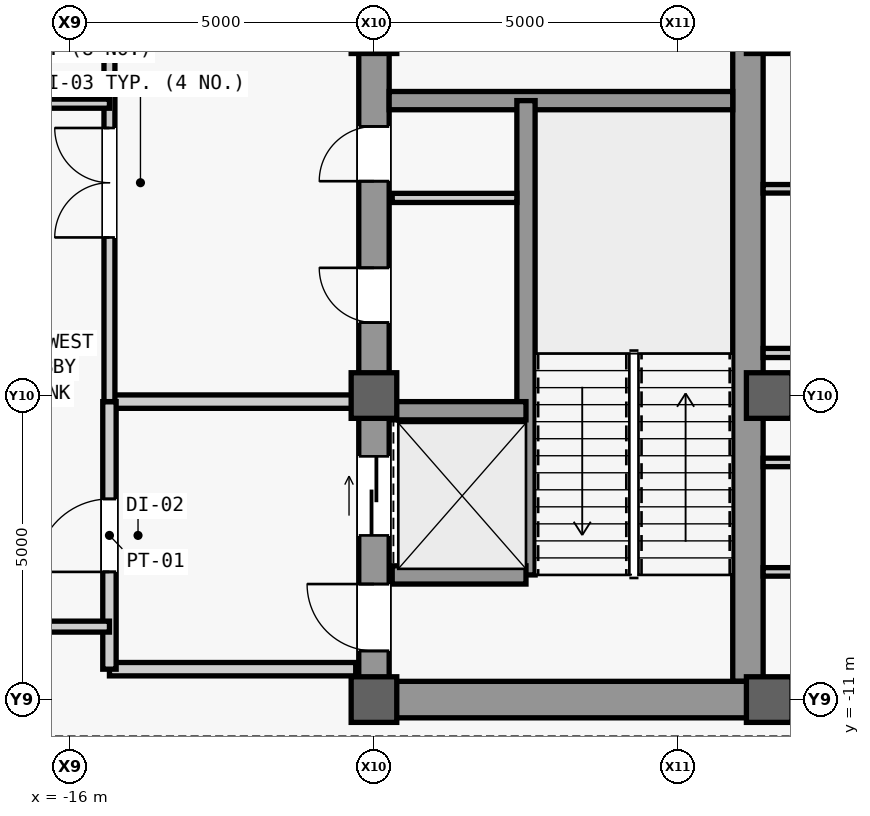
"""IFC4 building model, lengths in metres.
Left out: names, types, materials, properties, quantities, classifications, styles, units other than length and angle.
Written with IfcOpenShell. Run it as: python <this file> out.ifc"""

import sys

from ifc_helpers import new_model, si_unit, direction, frame, frame_2d, origin, origin_2d, place, context, subcontext, project, spatial, rectangle, extrude, source, transform, mapped, element, fill, save


model = new_model("IFC4")
c1 = context("Model", 3, precision=1e-05, world=origin(), true_north=direction((0.0, 1.0)))
c2 = subcontext(c1, "Body", "Model", "MODEL_VIEW")
j1 = project(units=[si_unit("LENGTHUNIT", "METRE"), si_unit("PLANEANGLEUNIT", "RADIAN")], contexts=[c1])
p1 = place(None, origin())
s1 = spatial("IfcSite", under=j1, at=p1, CompositionType="ELEMENT")
p2 = place(p1, origin())
s2 = spatial("IfcBuilding", under=s1, at=p2, CompositionType="ELEMENT")
p3 = place(p2, frame((0.0, 0.0, 321.5)))
s3 = spatial("IfcBuildingStorey", under=s2, at=p3, CompositionType="ELEMENT", Elevation=321.5)
m1 = source(origin(), c2, "Body", "SweptSolid", [
    extrude(rectangle(XDim=22.0, YDim=0.5, at=frame_2d((11.0, 0.0))), origin(), (0.0, 0.0, 1.0), 4.54),
])
p4 = place(p3, frame((-11.0, -11.0, 0.0), z_axis=(0.0, 0.0, 1.0), x_axis=(0.0, 1.0, 0.0)))
e1 = element("IfcWall", 1, at=p4, inside=s3, PredefinedType="SHEAR", context=c2, shape_type="MappedRepresentation", body=[
    mapped(m1, transform((0.0, 0.0, 0.0), scale=1.0)),
])
m2 = source(origin(), c2, "Body", "SweptSolid", [
    extrude(rectangle(XDim=1.1, YDim=2.2, at=frame_2d((0.55, 1.1))), frame((0.0, 0.26, 0.0), z_axis=(0.0, -1.0, 0.0), x_axis=(1.0, 0.0, 0.0)), (0.0, 0.0, 1.0), 0.52),
])
p5 = place(p4, frame((0.8, 0.0, 0.0)))
e2 = element("IfcOpeningElement", 2, at=p5, cuts=e1, PredefinedType="OPENING", context=c2, shape_type="MappedRepresentation", body=[
    mapped(m2, transform((0.0, 0.0, 0.0), scale=1.0)),
])
p6 = place(p4, frame((12.5, 0.0, 0.0)))
e3 = element("IfcOpeningElement", 3, at=p6, cuts=e1, PredefinedType="OPENING", context=c2, shape_type="MappedRepresentation", body=[
    mapped(m2, transform((0.0, 0.0, 0.0), scale=1.0)),
])
m3 = source(origin(), c2, "Body", "SweptSolid", [
    extrude(rectangle(XDim=0.9, YDim=2.15, at=frame_2d((0.45, 1.075))), frame((0.0, 0.26, 0.0), z_axis=(0.0, -1.0, 0.0), x_axis=(1.0, 0.0, 0.0)), (0.0, 0.0, 1.0), 0.52),
])
p7 = place(p4, frame((6.2, 0.0, 0.0)))
e4 = element("IfcOpeningElement", 4, at=p7, cuts=e1, PredefinedType="OPENING", context=c2, shape_type="MappedRepresentation", body=[
    mapped(m3, transform((0.0, 0.0, 0.0), scale=1.0)),
])
p8 = place(p4, frame((8.525, 0.0, 0.0)))
e5 = element("IfcOpeningElement", 5, at=p8, cuts=e1, PredefinedType="OPENING", context=c2, shape_type="MappedRepresentation", body=[
    mapped(m3, transform((0.0, 0.0, 0.0), scale=1.0)),
])
m4 = source(origin(), c2, "Body", "SweptSolid", [
    extrude(rectangle(XDim=1.2, YDim=2.3, at=frame_2d((0.6, 1.15))), frame((0.0, 0.26, 0.0), z_axis=(0.0, -1.0, 0.0), x_axis=(1.0, 0.0, 0.0)), (0.0, 0.0, 1.0), 0.52),
])
p9 = place(p4, frame((14.6, 0.0, 0.0)))
e6 = element("IfcOpeningElement", 6, at=p9, cuts=e1, PredefinedType="OPENING", context=c2, shape_type="MappedRepresentation", body=[
    mapped(m4, transform((0.0, 0.0, 0.0), scale=1.0)),
])
p10 = place(p4, frame((18.2, 0.0, 0.0)))
e7 = element("IfcOpeningElement", 7, at=p10, cuts=e1, PredefinedType="OPENING", context=c2, shape_type="MappedRepresentation", body=[
    mapped(m4, transform((0.0, 0.0, 0.0), scale=1.0)),
])
m5 = source(origin(), c2, "Body", "SweptSolid", [
    extrude(rectangle(XDim=1.3, YDim=2.3, at=frame_2d((0.65, 1.15))), frame((0.0, 0.26, 0.0), z_axis=(0.0, -1.0, 0.0), x_axis=(1.0, 0.0, 0.0)), (0.0, 0.0, 1.0), 0.52),
])
p11 = place(p4, frame((2.7, 0.0, 0.0)))
e8 = element("IfcOpeningElement", 8, at=p11, cuts=e1, PredefinedType="OPENING", context=c2, shape_type="MappedRepresentation", body=[
    mapped(m5, transform((0.0, 0.0, 0.0), scale=1.0)),
])
m6 = source(origin(), c2, "Body", "SweptSolid", [
    extrude(rectangle(XDim=21.4, YDim=0.5, at=frame_2d((10.7, 0.0))), origin(), (0.0, 0.0, 1.0), 4.54),
])
p12 = place(p3, frame((-4.85, -10.7, 0.0), z_axis=(0.0, 0.0, 1.0), x_axis=(0.0, 1.0, 0.0)))
e9 = element("IfcWall", 9, at=p12, inside=s3, PredefinedType="SHEAR", context=c2, shape_type="MappedRepresentation", body=[
    mapped(m6, transform((0.0, 0.0, 0.0), scale=1.0)),
])
m7 = source(origin(), c2, "Body", "SweptSolid", [
    extrude(rectangle(XDim=5.9, YDim=0.6, at=frame_2d((2.95, 0.0))), origin(), (0.0, 0.0, 1.0), 4.54),
])
p13 = place(p3, frame((-10.75, -11.0, 0.0), z_axis=(0.0, 0.0, 1.0), x_axis=(1.0, 0.0, 0.0)))
e10 = element("IfcWall", 10, at=p13, inside=s3, PredefinedType="SHEAR", context=c2, shape_type="MappedRepresentation", body=[
    mapped(m7, transform((0.0, 0.0, 0.0), scale=1.0)),
])
m8 = source(origin(), c2, "Body", "SweptSolid", [
    extrude(rectangle(XDim=5.65, YDim=0.3, at=frame_2d((2.825, 0.0))), origin(), (0.0, 0.0, 1.0), 4.54),
])
p14 = place(p3, frame((-10.75, -1.15, 0.0), z_axis=(0.0, 0.0, 1.0), x_axis=(1.0, 0.0, 0.0)))
e11 = element("IfcWall", 11, at=p14, inside=s3, PredefinedType="SHEAR", context=c2, shape_type="MappedRepresentation", body=[
    mapped(m8, transform((0.0, 0.0, 0.0), scale=1.0)),
])
m9 = source(origin(), c2, "Body", "SweptSolid", [
    extrude(rectangle(XDim=9.2, YDim=0.5, at=frame_2d((4.6, 0.0))), origin(), (0.0, 0.0, 1.0), 4.54),
])
p15 = place(p3, frame((-4.6, -11.0, 0.0), z_axis=(0.0, 0.0, 1.0), x_axis=(1.0, 0.0, 0.0)))
e12 = element("IfcWall", 12, at=p15, inside=s3, PredefinedType="SHEAR", context=c2, shape_type="MappedRepresentation", body=[
    mapped(m9, transform((0.0, 0.0, 0.0), scale=1.0)),
])
m10 = source(origin(), c2, "Body", "SweptSolid", [
    extrude(rectangle(XDim=1.8, YDim=2.25, at=frame_2d((0.9, 1.125))), frame((0.0, 0.26, 0.0), z_axis=(0.0, -1.0, 0.0), x_axis=(1.0, 0.0, 0.0)), (0.0, 0.0, 1.0), 0.52),
])
p16 = place(p15, frame((3.7, 0.0, 0.0)))
e13 = element("IfcOpeningElement", 13, at=p16, cuts=e12, PredefinedType="OPENING", context=c2, shape_type="MappedRepresentation", body=[
    mapped(m10, transform((0.0, 0.0, 0.0), scale=1.0)),
])
m11 = source(origin(), c2, "Body", "SweptSolid", [
    extrude(rectangle(XDim=0.75, YDim=0.75, at=origin_2d()), origin(), (0.0, 0.0, 1.0), 4.8),
])
for number, where, z_axis, x_axis in (
    (14, (-11.0, -11.0, 0.0), (0.0, 0.0, 1.0), (1.0, 0.0, 0.0)),
    (15, (-11.0, -6.0, 0.0), (0.0, 0.0, 1.0), (1.0, 0.0, 0.0)),
    (16, (-11.0, 0.0, 0.0), (0.0, 0.0, 1.0), (1.0, 0.0, 0.0)),
    (17, (-4.5, -11.0, 0.0), (0.0, 0.0, 1.0), (1.0, 0.0, 0.0)),
    (18, (-4.5, -6.0, 0.0), (0.0, 0.0, 1.0), (1.0, 0.0, 0.0)),
    (19, (-4.5, 0.0, 0.0), (0.0, 0.0, 1.0), (1.0, 0.0, 0.0)),
):
    element("IfcColumn", number, at=place(p3, frame(where, z_axis=z_axis, x_axis=x_axis)), inside=s3, PredefinedType="COLUMN", context=c2, shape_type="MappedRepresentation", body=[
        mapped(m11, transform((0.0, 0.0, 0.0), scale=1.0)),
    ])
m12 = source(origin(), c2, "Body", "SweptSolid", [
    extrude(rectangle(XDim=7.8, YDim=0.3, at=frame_2d((3.9, 0.0))), origin(), (0.0, 0.0, 1.0), 4.54),
])
p17 = place(p3, frame((-8.5, -8.95, 0.0), z_axis=(0.0, 0.0, 1.0), x_axis=(0.0, 1.0, 0.0)))
e20 = element("IfcWall", 20, at=p17, inside=s3, PredefinedType="SHEAR", context=c2, shape_type="MappedRepresentation", body=[
    mapped(m12, transform((0.0, 0.0, 0.0), scale=1.0)),
])
m13 = source(origin(), c2, "Body", "SweptSolid", [
    extrude(rectangle(XDim=2.2, YDim=0.3, at=frame_2d((1.1, 0.0))), origin(), (0.0, 0.0, 1.0), 4.54),
])
for number, where, z_axis, x_axis in (
    (21, (-10.7, -8.95, 0.0), (0.0, 0.0, 1.0), (1.0, 0.0, 0.0)),
    (22, (-10.7, -6.25, 0.0), (0.0, 0.0, 1.0), (1.0, 0.0, 0.0)),
):
    element("IfcWall", number, at=place(p3, frame(where, z_axis=z_axis, x_axis=x_axis)), inside=s3, PredefinedType="SHEAR", context=c2, shape_type="MappedRepresentation", body=[
        mapped(m13, transform((0.0, 0.0, 0.0), scale=1.0)),
    ])
m14 = source(origin(), c2, "Body", "SweptSolid", [
    extrude(rectangle(XDim=2.05, YDim=0.15, at=frame_2d((1.025, 0.0))), origin(), (0.0, 0.0, 1.0), 4.54),
])
p18 = place(p3, frame((-10.7, -2.75, 0.0), z_axis=(0.0, 0.0, 1.0), x_axis=(1.0, 0.0, 0.0)))
e23 = element("IfcWall", 23, at=p18, inside=s3, PredefinedType="PARTITIONING", context=c2, shape_type="MappedRepresentation", body=[
    mapped(m14, transform((0.0, 0.0, 0.0), scale=1.0)),
])
m15 = source(origin(), c2, "Body", "SweptSolid", [
    extrude(rectangle(XDim=4.05, YDim=0.22, at=frame_2d((2.025, 0.0))), origin(), (0.0, 0.0, 1.0), 4.54),
])
p19 = place(p3, frame((-15.35, -10.5, 0.0), z_axis=(0.0, 0.0, 1.0), x_axis=(1.0, 0.0, 0.0)))
e24 = element("IfcWall", 24, at=p19, inside=s3, PredefinedType="PARTITIONING", context=c2, shape_type="MappedRepresentation", body=[
    mapped(m15, transform((0.0, 0.0, 0.0), scale=1.0)),
])
m16 = source(origin(), c2, "Body", "SweptSolid", [
    extrude(rectangle(XDim=4.05, YDim=0.22, at=frame_2d((2.025, 0.0))), origin(), (0.0, 0.0, 1.0), 2.74),
])
p20 = place(p3, frame((-15.35, -6.1, 0.0), z_axis=(0.0, 0.0, 1.0), x_axis=(1.0, 0.0, 0.0)))
e25 = element("IfcWall", 25, at=p20, inside=s3, PredefinedType="PARTITIONING", context=c2, shape_type="MappedRepresentation", body=[
    mapped(m16, transform((0.0, 0.0, 0.0), scale=1.0)),
])
m17 = source(origin(), c2, "Body", "SweptSolid", [
    extrude(rectangle(XDim=4.4, YDim=0.22, at=frame_2d((2.2, 0.0))), origin(), (0.0, 0.0, 1.0), 4.54),
])
p21 = place(p3, frame((-15.35, -10.5, 0.0), z_axis=(0.0, 0.0, 1.0), x_axis=(0.0, 1.0, 0.0)))
e26 = element("IfcWall", 26, at=p21, inside=s3, PredefinedType="PARTITIONING", context=c2, shape_type="MappedRepresentation", body=[
    mapped(m17, transform((0.0, 0.0, 0.0), scale=1.0)),
])
m18 = source(origin(), c2, "Body", "SweptSolid", [
    extrude(rectangle(XDim=1.2, YDim=2.2, at=frame_2d((0.6, 1.1))), frame((0.0, 0.12, 0.0), z_axis=(0.0, -1.0, 0.0), x_axis=(1.0, 0.0, 0.0)), (0.0, 0.0, 1.0), 0.24),
])
p22 = place(p21, frame((1.6, 0.0, 0.0)))
e27 = element("IfcOpeningElement", 27, at=p22, cuts=e26, PredefinedType="OPENING", context=c2, shape_type="MappedRepresentation", body=[
    mapped(m18, transform((0.0, 0.0, 0.0), scale=1.0)),
])
m19 = source(origin(), c2, "Body", "SweptSolid", [
    extrude(rectangle(XDim=16.6, YDim=0.18, at=frame_2d((8.3, 0.0))), origin(), (0.0, 0.0, 1.0), 4.54),
])
p23 = place(p3, frame((-15.35, -6.1, 0.0), z_axis=(0.0, 0.0, 1.0), x_axis=(0.0, 1.0, 0.0)))
e28 = element("IfcWall", 28, at=p23, inside=s3, PredefinedType="PARTITIONING", context=c2, shape_type="MappedRepresentation", body=[
    mapped(m19, transform((0.0, 0.0, 0.0), scale=1.0)),
])
m20 = source(origin(), c2, "Body", "SweptSolid", [
    extrude(rectangle(XDim=1.8, YDim=2.25, at=frame_2d((0.9, 1.125))), frame((0.0, 0.1, 0.0), z_axis=(0.0, -1.0, 0.0), x_axis=(1.0, 0.0, 0.0)), (0.0, 0.0, 1.0), 0.2),
])
p24 = place(p23, frame((2.7, 0.0, 0.0)))
e29 = element("IfcOpeningElement", 29, at=p24, cuts=e28, PredefinedType="OPENING", context=c2, shape_type="MappedRepresentation", body=[
    mapped(m20, transform((0.0, 0.0, 0.0), scale=1.0)),
])
p25 = place(p23, frame((11.0, 0.0, 0.0)))
e30 = element("IfcOpeningElement", 30, at=p25, cuts=e28, PredefinedType="OPENING", context=c2, shape_type="MappedRepresentation", body=[
    mapped(m20, transform((0.0, 0.0, 0.0), scale=1.0)),
])
m21 = source(origin(), c2, "Body", "SweptSolid", [
    extrude(rectangle(XDim=3.45, YDim=0.14, at=frame_2d((1.725, 0.0))), origin(), (0.0, 0.0, 1.0), 4.54),
])
for number, where, z_axis, x_axis in (
    (31, (-4.6, -8.9, 0.0), (0.0, 0.0, 1.0), (1.0, 0.0, 0.0)),
    (32, (-4.6, -7.1, 0.0), (0.0, 0.0, 1.0), (1.0, 0.0, 0.0)),
):
    element("IfcWall", number, at=place(p3, frame(where, z_axis=z_axis, x_axis=x_axis)), inside=s3, PredefinedType="PARTITIONING", context=c2, shape_type="MappedRepresentation", body=[
        mapped(m21, transform((0.0, 0.0, 0.0), scale=1.0)),
    ])
m22 = source(origin(), c2, "Body", "SweptSolid", [
    extrude(rectangle(XDim=3.45, YDim=0.15, at=frame_2d((1.725, 0.0))), origin(), (0.0, 0.0, 1.0), 4.54),
])
p26 = place(p3, frame((-4.6, -5.3, 0.0), z_axis=(0.0, 0.0, 1.0), x_axis=(1.0, 0.0, 0.0)))
e33 = element("IfcWall", 33, at=p26, inside=s3, PredefinedType="PARTITIONING", context=c2, shape_type="MappedRepresentation", body=[
    mapped(m22, transform((0.0, 0.0, 0.0), scale=1.0)),
])
p27 = place(p3, frame((-4.6, -2.6, 0.0), z_axis=(0.0, 0.0, 1.0), x_axis=(1.0, 0.0, 0.0)))
e34 = element("IfcWall", 34, at=p27, inside=s3, PredefinedType="PARTITIONING", context=c2, shape_type="MappedRepresentation", body=[
    mapped(m21, transform((0.0, 0.0, 0.0), scale=1.0)),
])
m23 = source(origin(), c2, "Body", "SweptSolid", [
    extrude(rectangle(XDim=2.05, YDim=0.15, at=frame_2d((1.025, 0.0))), origin(), (0.0, 0.0, 1.0), 4.54),
])
p28 = place(p3, frame((-17.4, -1.2, 0.0), z_axis=(0.0, 0.0, 1.0), x_axis=(1.0, 0.0, 0.0)))
e35 = element("IfcWall", 35, at=p28, inside=s3, PredefinedType="PARTITIONING", context=c2, shape_type="MappedRepresentation", body=[
    mapped(m23, transform((0.0, 0.0, 0.0), scale=1.0)),
])
m24 = source(origin(), c2, "Body", "SweptSolid", [
    extrude(rectangle(XDim=2.05, YDim=0.18, at=frame_2d((1.025, 0.0))), origin(), (0.0, 0.0, 1.0), 4.54),
])
p29 = place(p3, frame((-17.4, -9.8, 0.0), z_axis=(0.0, 0.0, 1.0), x_axis=(1.0, 0.0, 0.0)))
e36 = element("IfcWall", 36, at=p29, inside=s3, PredefinedType="PARTITIONING", context=c2, shape_type="MappedRepresentation", body=[
    mapped(m24, transform((0.0, 0.0, 0.0), scale=1.0)),
])
m25 = source(origin(), c2, "Body", "SweptSolid", [
    extrude(rectangle(XDim=1.1, YDim=2.2, at=frame_2d((0.55, 1.1))), frame((0.0, 0.025, 0.0), z_axis=(0.0, -1.0, 0.0), x_axis=(1.0, 0.0, 0.0)), (0.0, 0.0, 1.0), 0.05),
])
p30 = place(p5, origin())
e37 = element("IfcDoor", 37, at=p30, inside=s3, OperationType="SINGLE_SWING_RIGHT", PredefinedType="DOOR", context=c2, shape_type="MappedRepresentation", body=[
    mapped(m25, transform((0.0, 0.0, 0.0), scale=1.0)),
])
fill(e2, e37)
m26 = source(origin(), c2, "Body", "SweptSolid", [
    extrude(rectangle(XDim=0.9, YDim=2.15, at=frame_2d((0.45, 1.075))), frame((0.0, 0.025, 0.0), z_axis=(0.0, -1.0, 0.0), x_axis=(1.0, 0.0, 0.0)), (0.0, 0.0, 1.0), 0.05),
])
p31 = place(p7, origin())
e38 = element("IfcDoor", 38, at=p31, inside=s3, OperationType="SINGLE_SWING_RIGHT", PredefinedType="DOOR", context=c2, shape_type="MappedRepresentation", body=[
    mapped(m26, transform((0.0, 0.0, 0.0), scale=1.0)),
])
fill(e4, e38)
p32 = place(p8, origin())
e39 = element("IfcDoor", 39, at=p32, inside=s3, OperationType="SINGLE_SWING_LEFT", PredefinedType="DOOR", context=c2, shape_type="MappedRepresentation", body=[
    mapped(m26, transform((0.0, 0.0, 0.0), scale=1.0)),
])
fill(e5, e39)
m27 = source(origin(), c2, "Body", "SweptSolid", [
    extrude(rectangle(XDim=1.2, YDim=2.2, at=frame_2d((0.6, 1.1))), frame((0.0, 0.025, 0.0), z_axis=(0.0, -1.0, 0.0), x_axis=(1.0, 0.0, 0.0)), (0.0, 0.0, 1.0), 0.05),
])
p33 = place(p22, origin())
e40 = element("IfcDoor", 40, at=p33, inside=s3, OperationType="SINGLE_SWING_LEFT", PredefinedType="DOOR", context=c2, shape_type="MappedRepresentation", body=[
    mapped(m27, transform((0.0, 0.0, 0.0), scale=1.0)),
])
fill(e27, e40)
m28 = source(origin(), c2, "Body", "SweptSolid", [
    extrude(rectangle(XDim=1.8, YDim=2.25, at=frame_2d((0.9, 1.125))), frame((0.0, 0.025, 0.0), z_axis=(0.0, -1.0, 0.0), x_axis=(1.0, 0.0, 0.0)), (0.0, 0.0, 1.0), 0.05),
])
p34 = place(p24, origin())
e41 = element("IfcDoor", 41, at=p34, inside=s3, OperationType="SINGLE_SWING_LEFT", PredefinedType="DOOR", context=c2, shape_type="MappedRepresentation", body=[
    mapped(m28, transform((0.0, 0.0, 0.0), scale=1.0)),
])
fill(e29, e41)
m29 = source(origin(), c2, "Body", "SweptSolid", [
    extrude(rectangle(XDim=1.3, YDim=2.3, at=frame_2d((0.65, 1.15))), frame((0.0, 0.025, 0.0), z_axis=(0.0, -1.0, 0.0), x_axis=(1.0, 0.0, 0.0)), (0.0, 0.0, 1.0), 0.05),
])
p35 = place(p11, origin())
e42 = element("IfcDoor", 42, at=p35, inside=s3, OperationType="SLIDING_TO_LEFT", PredefinedType="DOOR", context=c2, shape_type="MappedRepresentation", body=[
    mapped(m29, transform((0.0, 0.0, 0.0), scale=1.0)),
])
fill(e8, e42)
save(model, sys.argv[1])
